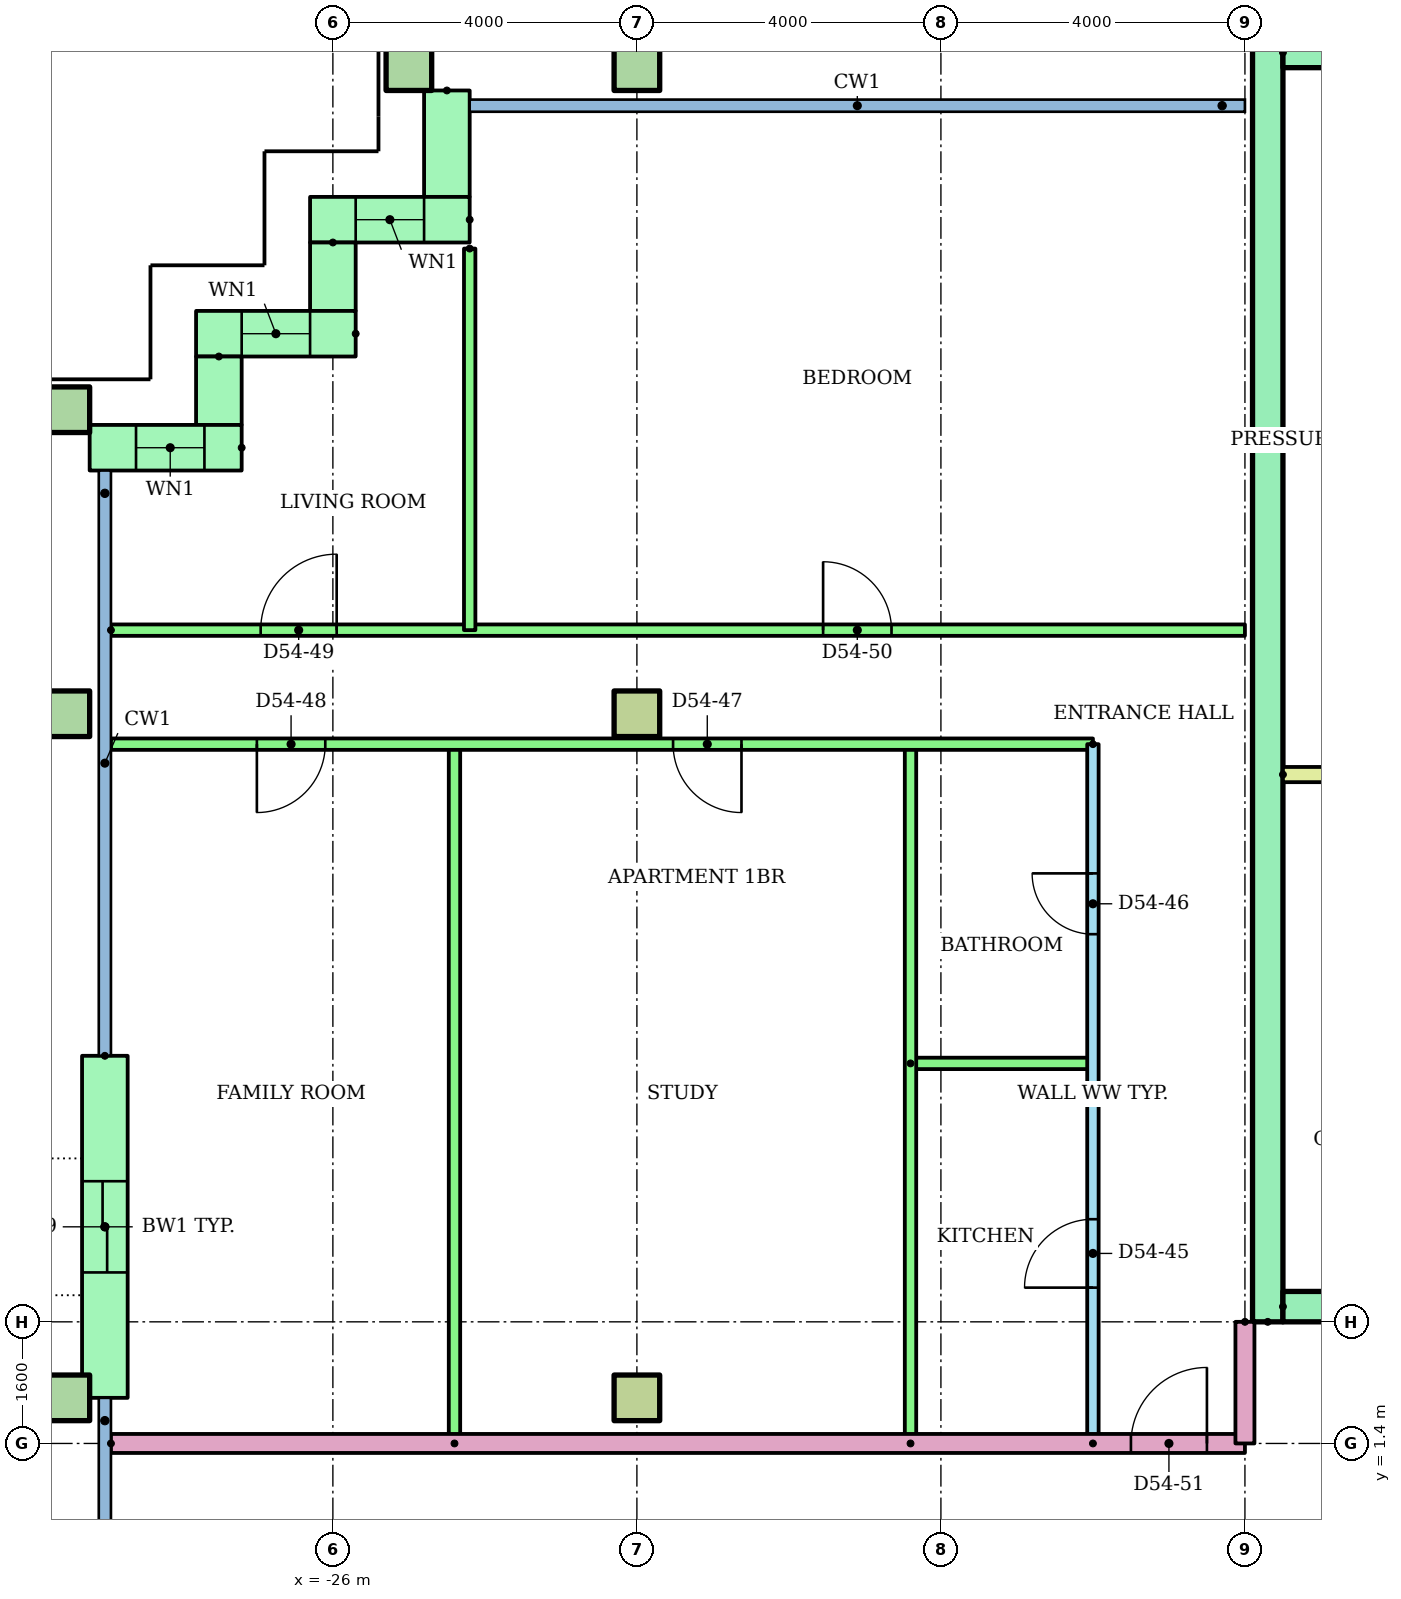
"""IFC4 building model, lengths in metres.
Left out: names, types, materials, properties, quantities, classifications, styles, units other than length and angle.
Written with IfcOpenShell. Run it as: python <this file> out.ifc"""

import sys

from ifc_helpers import new_model, si_unit, direction, frame, frame_2d, origin, origin_2d, place, context, subcontext, project, spatial, rectangle, hollow_rectangle, extrude, element, fill, save


model = new_model("IFC4")
c1 = context("Model", 3, precision=1e-05, world=origin(), true_north=direction((0.0, 1.0)))
c2 = subcontext(c1, "Body", "Model", "MODEL_VIEW")
j1 = project(units=[si_unit("LENGTHUNIT", "METRE"), si_unit("PLANEANGLEUNIT", "RADIAN")], contexts=[c1])
p1 = place(None, origin())
s1 = spatial("IfcSite", under=j1, at=p1, CompositionType="ELEMENT")
p2 = place(p1, origin())
s2 = spatial("IfcBuilding", under=s1, at=p2, CompositionType="ELEMENT")
p3 = place(p2, frame((0.0, 0.0, 210.8)))
s3 = spatial("IfcBuildingStorey", under=s2, at=p3, CompositionType="ELEMENT", Elevation=210.8)
p4 = place(p3, frame((-29.5, 2.0, 0.0)))
e1 = element("IfcColumn", 1, at=p4, inside=s3, PredefinedType="COLUMN", context=c2, shape_type="SweptSolid", body=[
    extrude(hollow_rectangle(XDim=0.6, YDim=0.6, WallThickness=0.03, at=origin_2d()), origin(), (0.0, 0.0, 1.0), 3.2),
])
p5 = place(p3, frame((-22.0, 2.0, 0.0)))
e2 = element("IfcColumn", 2, at=p5, inside=s3, PredefinedType="COLUMN", context=c2, shape_type="SweptSolid", body=[
    extrude(rectangle(XDim=0.6, YDim=0.6, at=origin_2d()), origin(), (0.0, 0.0, 1.0), 3.2),
])
p6 = place(p3, frame((-29.5, 11.0, 0.0)))
e3 = element("IfcColumn", 3, at=p6, inside=s3, PredefinedType="COLUMN", context=c2, shape_type="SweptSolid", body=[
    extrude(hollow_rectangle(XDim=0.6, YDim=0.6, WallThickness=0.03, at=origin_2d()), origin(), (0.0, 0.0, 1.0), 3.2),
])
p7 = place(p3, frame((-22.0, 11.0, 0.0)))
e4 = element("IfcColumn", 4, at=p7, inside=s3, PredefinedType="COLUMN", context=c2, shape_type="SweptSolid", body=[
    extrude(rectangle(XDim=0.6, YDim=0.6, at=origin_2d()), origin(), (0.0, 0.0, 1.0), 3.2),
])
for number, where in (
    (5, (-29.5, 15.0, 0.0)),
    (6, (-25.0, 19.5, 0.0)),
    (7, (-22.0, 19.5, 0.0)),
):
    element("IfcColumn", number, at=place(p3, frame(where)), inside=s3, PredefinedType="COLUMN", context=c2, shape_type="SweptSolid", body=[
        extrude(hollow_rectangle(XDim=0.6, YDim=0.6, WallThickness=0.03, at=origin_2d()), origin(), (0.0, 0.0, 1.0), 3.2),
    ])
p8 = place(p3, frame((-24.5, 19.2, 0.0), z_axis=(0.0, 0.0, 1.0), x_axis=(0.0, -1.0, 0.0)))
e8 = element("IfcWall", 8, at=p8, inside=s3, PredefinedType="STANDARD", context=c2, shape_type="SweptSolid", body=[
    extrude(rectangle(XDim=1.4, YDim=0.6, at=frame_2d((0.7, 0.0))), origin(), (0.0, 0.0, 1.0), 2.92),
])
p9 = place(p3, frame((-24.2, 17.5, 0.0), z_axis=(0.0, 0.0, 1.0), x_axis=(-1.0, 0.0, 0.0)))
e9 = element("IfcWall", 9, at=p9, inside=s3, PredefinedType="STANDARD", context=c2, shape_type="SweptSolid", body=[
    extrude(rectangle(XDim=2.1, YDim=0.6, at=frame_2d((1.05, 0.0))), origin(), (0.0, 0.0, 1.0), 2.92),
])
p10 = place(p9, frame((0.6, 0.0, 0.9)))
e10 = element("IfcOpeningElement", 10, at=p10, cuts=e9, PredefinedType="OPENING", context=c2, shape_type="SweptSolid", body=[
    extrude(rectangle(XDim=0.9, YDim=1.5, at=frame_2d((0.45, 0.75))), frame((0.0, 0.31, 0.0), z_axis=(0.0, -1.0, 0.0), x_axis=(1.0, 0.0, 0.0)), (0.0, 0.0, 1.0), 0.62),
])
p11 = place(p3, frame((-26.0, 17.2, 0.0), z_axis=(0.0, 0.0, 1.0), x_axis=(0.0, -1.0, 0.0)))
e11 = element("IfcWall", 11, at=p11, inside=s3, PredefinedType="STANDARD", context=c2, shape_type="SweptSolid", body=[
    extrude(rectangle(XDim=0.9, YDim=0.6, at=frame_2d((0.45, 0.0))), origin(), (0.0, 0.0, 1.0), 2.92),
])
p12 = place(p3, frame((-25.7, 16.0, 0.0), z_axis=(0.0, 0.0, 1.0), x_axis=(-1.0, 0.0, 0.0)))
e12 = element("IfcWall", 12, at=p12, inside=s3, PredefinedType="STANDARD", context=c2, shape_type="SweptSolid", body=[
    extrude(rectangle(XDim=2.1, YDim=0.6, at=frame_2d((1.05, 0.0))), origin(), (0.0, 0.0, 1.0), 2.92),
])
p13 = place(p12, frame((0.6, 0.0, 0.9)))
e13 = element("IfcOpeningElement", 13, at=p13, cuts=e12, PredefinedType="OPENING", context=c2, shape_type="SweptSolid", body=[
    extrude(rectangle(XDim=0.9, YDim=1.5, at=frame_2d((0.45, 0.75))), frame((0.0, 0.31, 0.0), z_axis=(0.0, -1.0, 0.0), x_axis=(1.0, 0.0, 0.0)), (0.0, 0.0, 1.0), 0.62),
])
p14 = place(p3, frame((-27.5, 15.7, 0.0), z_axis=(0.0, 0.0, 1.0), x_axis=(0.0, -1.0, 0.0)))
e14 = element("IfcWall", 14, at=p14, inside=s3, PredefinedType="STANDARD", context=c2, shape_type="SweptSolid", body=[
    extrude(rectangle(XDim=0.9, YDim=0.6, at=frame_2d((0.45, 0.0))), origin(), (0.0, 0.0, 1.0), 2.92),
])
p15 = place(p3, frame((-27.2, 14.5, 0.0), z_axis=(0.0, 0.0, 1.0), x_axis=(-1.0, 0.0, 0.0)))
e15 = element("IfcWall", 15, at=p15, inside=s3, PredefinedType="STANDARD", context=c2, shape_type="SweptSolid", body=[
    extrude(rectangle(XDim=2.0, YDim=0.6, at=frame_2d((1.0, 0.0))), origin(), (0.0, 0.0, 1.0), 2.92),
])
p16 = place(p15, frame((0.49, 0.0, 0.9)))
e16 = element("IfcOpeningElement", 16, at=p16, cuts=e15, PredefinedType="OPENING", context=c2, shape_type="SweptSolid", body=[
    extrude(rectangle(XDim=0.9, YDim=1.5, at=frame_2d((0.45, 0.75))), frame((0.0, 0.31, 0.0), z_axis=(0.0, -1.0, 0.0), x_axis=(1.0, 0.0, 0.0)), (0.0, 0.0, 1.0), 0.62),
])
p17 = place(p3, frame((-29.0, 6.5, 0.0), z_axis=(0.0, 0.0, 1.0), x_axis=(0.0, -1.0, 0.0)))
e17 = element("IfcWall", 17, at=p17, inside=s3, PredefinedType="STANDARD", context=c2, shape_type="SweptSolid", body=[
    extrude(rectangle(XDim=4.5, YDim=0.6, at=frame_2d((2.25, 0.0))), origin(), (0.0, 0.0, 1.0), 2.92),
])
p18 = place(p17, frame((1.65, 0.0, 0.0)))
e18 = element("IfcOpeningElement", 18, at=p18, cuts=e17, PredefinedType="OPENING", context=c2, shape_type="SweptSolid", body=[
    extrude(rectangle(XDim=1.2, YDim=2.1, at=frame_2d((0.6, 1.05))), frame((0.0, 0.31, 0.0), z_axis=(0.0, -1.0, 0.0), x_axis=(1.0, 0.0, 0.0)), (0.0, 0.0, 1.0), 0.62),
])
p19 = place(p3, frame((-13.7, 3.0, 0.0), z_axis=(0.0, 0.0, 1.0), x_axis=(0.0, 1.0, 0.0)))
e19 = element("IfcWall", 19, at=p19, inside=s3, PredefinedType="SHEAR", context=c2, shape_type="SweptSolid", body=[
    extrude(rectangle(XDim=17.0, YDim=0.4, at=frame_2d((8.5, 0.0))), origin(), (0.0, 0.0, 1.0), 2.92),
])
p20 = place(p3, frame((-13.5, 19.7, 0.0)))
e20 = element("IfcWall", 20, at=p20, inside=s3, PredefinedType="SHEAR", context=c2, shape_type="SweptSolid", body=[
    extrude(rectangle(XDim=27.0, YDim=0.4, at=frame_2d((13.5, 0.0))), origin(), (0.0, 0.0, 1.0), 2.92),
])
p21 = place(p3, frame((-13.5, 3.2, 0.0)))
e21 = element("IfcWall", 21, at=p21, inside=s3, PredefinedType="SHEAR", context=c2, shape_type="SweptSolid", body=[
    extrude(rectangle(XDim=27.0, YDim=0.4, at=frame_2d((13.5, 0.0))), origin(), (0.0, 0.0, 1.0), 2.92),
])
p22 = place(p21, frame((22.083, 0.0, 0.0)))
e22 = element("IfcOpeningElement", 22, at=p22, cuts=e21, PredefinedType="OPENING", context=c2, shape_type="SweptSolid", body=[
    extrude(rectangle(XDim=1.1, YDim=2.1, at=frame_2d((0.55, 1.05))), frame((0.0, 0.21, 0.0), z_axis=(0.0, -1.0, 0.0), x_axis=(1.0, 0.0, 0.0)), (0.0, 0.0, 1.0), 0.42),
])
p23 = place(p21, frame((25.128, 0.0, 0.0)))
e23 = element("IfcOpeningElement", 23, at=p23, cuts=e21, PredefinedType="OPENING", context=c2, shape_type="SweptSolid", body=[
    extrude(rectangle(XDim=1.1, YDim=2.1, at=frame_2d((0.55, 1.05))), frame((0.0, 0.21, 0.0), z_axis=(0.0, -1.0, 0.0), x_axis=(1.0, 0.0, 0.0)), (0.0, 0.0, 1.0), 0.42),
])
p24 = place(p21, frame((12.6, 0.0, 0.0)))
e24 = element("IfcOpeningElement", 24, at=p24, cuts=e21, PredefinedType="OPENING", context=c2, shape_type="SweptSolid", body=[
    extrude(rectangle(XDim=1.8, YDim=2.1, at=frame_2d((0.9, 1.05))), frame((0.0, 0.21, 0.0), z_axis=(0.0, -1.0, 0.0), x_axis=(1.0, 0.0, 0.0)), (0.0, 0.0, 1.0), 0.42),
])
p25 = place(p3, frame((-13.5, 10.2, 0.0)))
e25 = element("IfcWall", 25, at=p25, inside=s3, PredefinedType="PARTITIONING", context=c2, shape_type="SweptSolid", body=[
    extrude(rectangle(XDim=3.9, YDim=0.2, at=frame_2d((1.95, 0.0))), origin(), (0.0, 0.0, 1.0), 2.92),
])
p26 = place(p3, frame((-16.0, 1.4, 0.0), z_axis=(0.0, 0.0, 1.0), x_axis=(0.0, 1.0, 0.0)))
e26 = element("IfcWall", 26, at=p26, inside=s3, PredefinedType="PARTITIONING", context=c2, shape_type="SweptSolid", body=[
    extrude(rectangle(XDim=9.2, YDim=0.15, at=frame_2d((4.6, 0.0))), origin(), (0.0, 0.0, 1.0), 2.4),
])
p27 = place(p26, frame((2.05, 0.0, 0.0)))
e27 = element("IfcOpeningElement", 27, at=p27, cuts=e26, PredefinedType="OPENING", context=c2, shape_type="SweptSolid", body=[
    extrude(rectangle(XDim=0.9, YDim=2.1, at=frame_2d((0.45, 1.05))), frame((0.0, 0.085, 0.0), z_axis=(0.0, -1.0, 0.0), x_axis=(1.0, 0.0, 0.0)), (0.0, 0.0, 1.0), 0.17),
])
p28 = place(p26, frame((6.7, 0.0, 0.0)))
e28 = element("IfcOpeningElement", 28, at=p28, cuts=e26, PredefinedType="OPENING", context=c2, shape_type="SweptSolid", body=[
    extrude(rectangle(XDim=0.8, YDim=2.1, at=frame_2d((0.4, 1.05))), frame((0.0, 0.085, 0.0), z_axis=(0.0, -1.0, 0.0), x_axis=(1.0, 0.0, 0.0)), (0.0, 0.0, 1.0), 0.17),
])
p29 = place(p3, frame((-18.4, 6.4, 0.0)))
e29 = element("IfcWall", 29, at=p29, inside=s3, PredefinedType="PARTITIONING", context=c2, shape_type="SweptSolid", body=[
    extrude(rectangle(XDim=2.4, YDim=0.15, at=frame_2d((1.2, 0.0))), origin(), (0.0, 0.0, 1.0), 2.4),
])
for number, where, z_axis, x_axis in (
    (30, (-18.4, 1.4, 0.0), (0.0, 0.0, 1.0), (0.0, 1.0, 0.0)),
    (31, (-24.4, 1.4, 0.0), (0.0, 0.0, 1.0), (0.0, 1.0, 0.0)),
):
    element("IfcWall", number, at=place(p3, frame(where, z_axis=z_axis, x_axis=x_axis)), inside=s3, PredefinedType="PARTITIONING", context=c2, shape_type="SweptSolid", body=[
        extrude(rectangle(XDim=9.2, YDim=0.15, at=frame_2d((4.6, 0.0))), origin(), (0.0, 0.0, 1.0), 2.4),
    ])
p30 = place(p3, frame((-16.0, 10.6, 0.0), z_axis=(0.0, 0.0, 1.0), x_axis=(-1.0, 0.0, 0.0)))
e32 = element("IfcWall", 32, at=p30, inside=s3, PredefinedType="PARTITIONING", context=c2, shape_type="SweptSolid", body=[
    extrude(rectangle(XDim=12.92, YDim=0.15, at=frame_2d((6.46, 0.0))), origin(), (0.0, 0.0, 1.0), 2.4),
])
p31 = place(p30, frame((4.624, 0.0, 0.0)))
e33 = element("IfcOpeningElement", 33, at=p31, cuts=e32, PredefinedType="OPENING", context=c2, shape_type="SweptSolid", body=[
    extrude(rectangle(XDim=0.9, YDim=2.1, at=frame_2d((0.45, 1.05))), frame((0.0, 0.085, 0.0), z_axis=(0.0, -1.0, 0.0), x_axis=(1.0, 0.0, 0.0)), (0.0, 0.0, 1.0), 0.17),
])
p32 = place(p30, frame((10.1, 0.0, 0.0)))
e34 = element("IfcOpeningElement", 34, at=p32, cuts=e32, PredefinedType="OPENING", context=c2, shape_type="SweptSolid", body=[
    extrude(rectangle(XDim=0.9, YDim=2.1, at=frame_2d((0.45, 1.05))), frame((0.0, 0.085, 0.0), z_axis=(0.0, -1.0, 0.0), x_axis=(1.0, 0.0, 0.0)), (0.0, 0.0, 1.0), 0.17),
])
p33 = place(p3, frame((-28.92, 12.1, 0.0)))
e35 = element("IfcWall", 35, at=p33, inside=s3, PredefinedType="PARTITIONING", context=c2, shape_type="SweptSolid", body=[
    extrude(rectangle(XDim=14.92, YDim=0.15, at=frame_2d((7.46, 0.0))), origin(), (0.0, 0.0, 1.0), 2.4),
])
p34 = place(p33, frame((1.97, 0.0, 0.0)))
e36 = element("IfcOpeningElement", 36, at=p34, cuts=e35, PredefinedType="OPENING", context=c2, shape_type="SweptSolid", body=[
    extrude(rectangle(XDim=1.0, YDim=2.1, at=frame_2d((0.5, 1.05))), frame((0.0, 0.085, 0.0), z_axis=(0.0, -1.0, 0.0), x_axis=(1.0, 0.0, 0.0)), (0.0, 0.0, 1.0), 0.17),
])
p35 = place(p33, frame((9.37, 0.0, 0.0)))
e37 = element("IfcOpeningElement", 37, at=p35, cuts=e35, PredefinedType="OPENING", context=c2, shape_type="SweptSolid", body=[
    extrude(rectangle(XDim=0.9, YDim=2.1, at=frame_2d((0.45, 1.05))), frame((0.0, 0.085, 0.0), z_axis=(0.0, -1.0, 0.0), x_axis=(1.0, 0.0, 0.0)), (0.0, 0.0, 1.0), 0.17),
])
p36 = place(p3, frame((-24.2, 17.12, 0.0), z_axis=(0.0, 0.0, 1.0), x_axis=(0.0, -1.0, 0.0)))
e38 = element("IfcWall", 38, at=p36, inside=s3, PredefinedType="PARTITIONING", context=c2, shape_type="SweptSolid", body=[
    extrude(rectangle(XDim=5.02, YDim=0.15, at=frame_2d((2.51, 0.0))), origin(), (0.0, 0.0, 1.0), 2.4),
])
p37 = place(p3, frame((-28.92, 1.4, 0.0)))
e39 = element("IfcWall", 39, at=p37, inside=s3, PredefinedType="PARTITIONING", context=c2, shape_type="SweptSolid", body=[
    extrude(rectangle(XDim=14.92, YDim=0.25, at=frame_2d((7.46, 0.0))), origin(), (0.0, 0.0, 1.0), 2.4),
])
p38 = place(p37, frame((13.42, 0.0, 0.0)))
e40 = element("IfcOpeningElement", 40, at=p38, cuts=e39, PredefinedType="OPENING", context=c2, shape_type="SweptSolid", body=[
    extrude(rectangle(XDim=1.0, YDim=2.1, at=frame_2d((0.5, 1.05))), frame((0.0, 0.135, 0.0), z_axis=(0.0, -1.0, 0.0), x_axis=(1.0, 0.0, 0.0)), (0.0, 0.0, 1.0), 0.27),
])
p39 = place(p3, frame((-14.0, 3.0, 0.0), z_axis=(0.0, 0.0, 1.0), x_axis=(0.0, -1.0, 0.0)))
e41 = element("IfcWall", 41, at=p39, inside=s3, PredefinedType="PARTITIONING", context=c2, shape_type="SweptSolid", body=[
    extrude(rectangle(XDim=1.6, YDim=0.25, at=frame_2d((0.8, 0.0))), origin(), (0.0, 0.0, 1.0), 2.4),
])
p40 = place(p10, origin())
e42 = element("IfcWindow", 42, at=p40, inside=s3, PartitioningType="SINGLE_PANEL", PredefinedType="WINDOW", context=c2, shape_type="SweptSolid", body=[
    extrude(rectangle(XDim=0.9, YDim=1.5, at=frame_2d((0.45, 0.75))), frame((0.0, 0.03, 0.0), z_axis=(0.0, -1.0, 0.0), x_axis=(1.0, 0.0, 0.0)), (0.0, 0.0, 1.0), 0.06),
])
fill(e10, e42)
p41 = place(p13, origin())
e43 = element("IfcWindow", 43, at=p41, inside=s3, PartitioningType="SINGLE_PANEL", PredefinedType="WINDOW", context=c2, shape_type="SweptSolid", body=[
    extrude(rectangle(XDim=0.9, YDim=1.5, at=frame_2d((0.45, 0.75))), frame((0.0, 0.03, 0.0), z_axis=(0.0, -1.0, 0.0), x_axis=(1.0, 0.0, 0.0)), (0.0, 0.0, 1.0), 0.06),
])
fill(e13, e43)
p42 = place(p16, origin())
e44 = element("IfcWindow", 44, at=p42, inside=s3, PartitioningType="SINGLE_PANEL", PredefinedType="WINDOW", context=c2, shape_type="SweptSolid", body=[
    extrude(rectangle(XDim=0.9, YDim=1.5, at=frame_2d((0.45, 0.75))), frame((0.0, 0.03, 0.0), z_axis=(0.0, -1.0, 0.0), x_axis=(1.0, 0.0, 0.0)), (0.0, 0.0, 1.0), 0.06),
])
fill(e16, e44)
p43 = place(p27, origin())
e45 = element("IfcDoor", 45, at=p43, inside=s3, OperationType="SINGLE_SWING_LEFT", PredefinedType="DOOR", context=c2, shape_type="SweptSolid", body=[
    extrude(rectangle(XDim=0.9, YDim=2.1, at=frame_2d((0.45, 1.05))), frame((0.0, 0.025, 0.0), z_axis=(0.0, -1.0, 0.0), x_axis=(1.0, 0.0, 0.0)), (0.0, 0.0, 1.0), 0.05),
])
fill(e27, e45)
p44 = place(p28, origin())
e46 = element("IfcDoor", 46, at=p44, inside=s3, OperationType="SINGLE_SWING_RIGHT", PredefinedType="DOOR", context=c2, shape_type="SweptSolid", body=[
    extrude(rectangle(XDim=0.8, YDim=2.1, at=frame_2d((0.4, 1.05))), frame((0.0, 0.025, 0.0), z_axis=(0.0, -1.0, 0.0), x_axis=(1.0, 0.0, 0.0)), (0.0, 0.0, 1.0), 0.05),
])
fill(e28, e46)
p45 = place(p31, origin())
e47 = element("IfcDoor", 47, at=p45, inside=s3, OperationType="SINGLE_SWING_LEFT", PredefinedType="DOOR", context=c2, shape_type="SweptSolid", body=[
    extrude(rectangle(XDim=0.9, YDim=2.1, at=frame_2d((0.45, 1.05))), frame((0.0, 0.025, 0.0), z_axis=(0.0, -1.0, 0.0), x_axis=(1.0, 0.0, 0.0)), (0.0, 0.0, 1.0), 0.05),
])
fill(e33, e47)
p46 = place(p32, origin())
e48 = element("IfcDoor", 48, at=p46, inside=s3, OperationType="SINGLE_SWING_RIGHT", PredefinedType="DOOR", context=c2, shape_type="SweptSolid", body=[
    extrude(rectangle(XDim=0.9, YDim=2.1, at=frame_2d((0.45, 1.05))), frame((0.0, 0.025, 0.0), z_axis=(0.0, -1.0, 0.0), x_axis=(1.0, 0.0, 0.0)), (0.0, 0.0, 1.0), 0.05),
])
fill(e34, e48)
p47 = place(p34, origin())
e49 = element("IfcDoor", 49, at=p47, inside=s3, OperationType="SINGLE_SWING_RIGHT", PredefinedType="DOOR", context=c2, shape_type="SweptSolid", body=[
    extrude(rectangle(XDim=1.0, YDim=2.1, at=frame_2d((0.5, 1.05))), frame((0.0, 0.025, 0.0), z_axis=(0.0, -1.0, 0.0), x_axis=(1.0, 0.0, 0.0)), (0.0, 0.0, 1.0), 0.05),
])
fill(e36, e49)
p48 = place(p35, origin())
e50 = element("IfcDoor", 50, at=p48, inside=s3, OperationType="SINGLE_SWING_LEFT", PredefinedType="DOOR", context=c2, shape_type="SweptSolid", body=[
    extrude(rectangle(XDim=0.9, YDim=2.1, at=frame_2d((0.45, 1.05))), frame((0.0, 0.025, 0.0), z_axis=(0.0, -1.0, 0.0), x_axis=(1.0, 0.0, 0.0)), (0.0, 0.0, 1.0), 0.05),
])
fill(e37, e50)
p49 = place(p38, origin())
e51 = element("IfcDoor", 51, at=p49, inside=s3, OperationType="SINGLE_SWING_RIGHT", PredefinedType="DOOR", context=c2, shape_type="SweptSolid", body=[
    extrude(rectangle(XDim=1.0, YDim=2.1, at=frame_2d((0.5, 1.05))), frame((0.0, 0.025, 0.0), z_axis=(0.0, -1.0, 0.0), x_axis=(1.0, 0.0, 0.0)), (0.0, 0.0, 1.0), 0.05),
])
fill(e40, e51)
p50 = place(p18, origin())
e52 = element("IfcDoor", 52, at=p50, inside=s3, OperationType="SLIDING_TO_LEFT", PredefinedType="DOOR", context=c2, shape_type="SweptSolid", body=[
    extrude(rectangle(XDim=1.2, YDim=2.1, at=frame_2d((0.6, 1.05))), frame((0.0, 0.025, 0.0), z_axis=(0.0, -1.0, 0.0), x_axis=(1.0, 0.0, 0.0)), (0.0, 0.0, 1.0), 0.05),
])
fill(e18, e52)
save(model, sys.argv[1])
